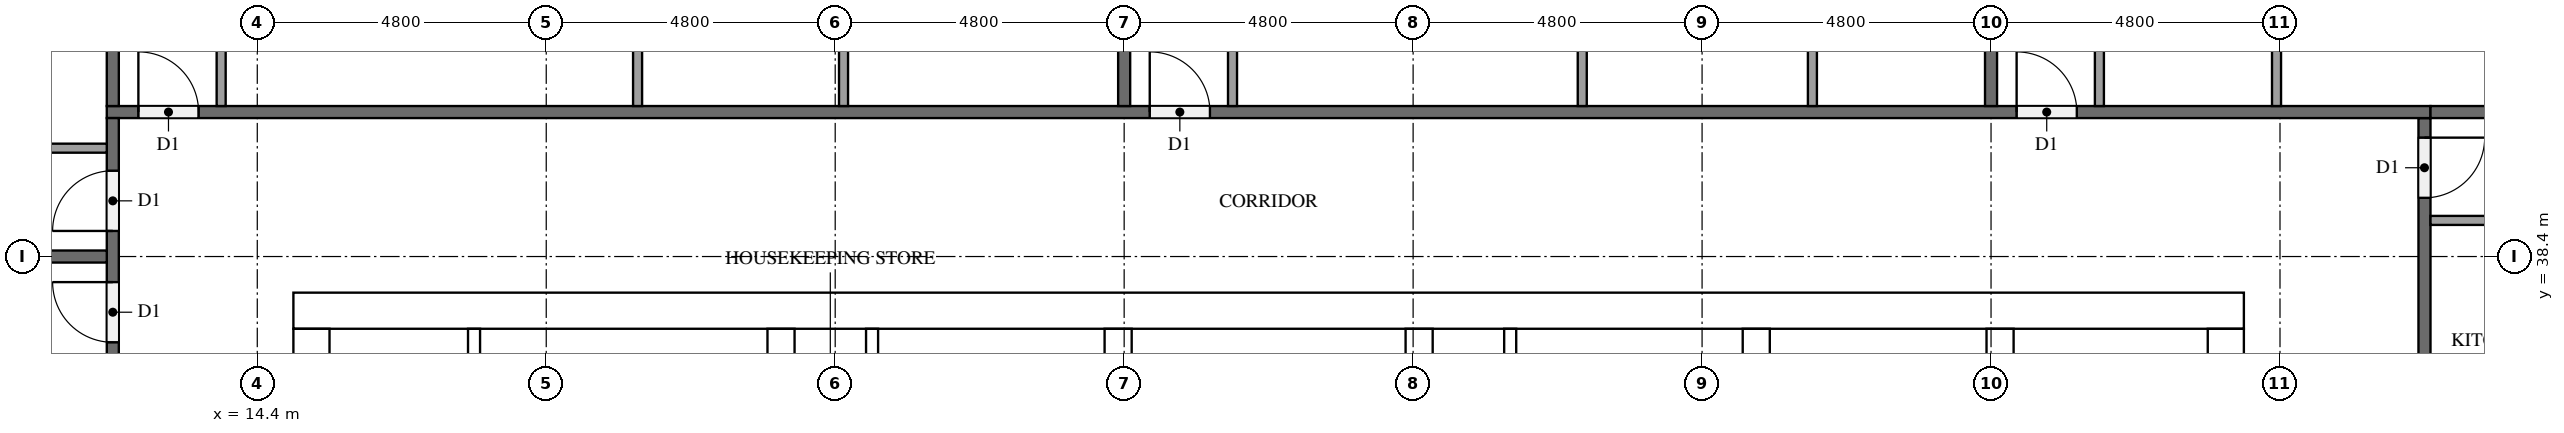
"""IFC4 building model, lengths in metres.
Left out: names, types, materials, properties, quantities, classifications, styles, units other than length and angle.
Written with IfcOpenShell. Run it as: python <this file> out.ifc"""

import sys

from ifc_helpers import new_model, si_unit, direction, frame, frame_2d, origin, place, context, subcontext, project, spatial, rectangle, extrude, element, fill, save


model = new_model("IFC4")
c1 = context("Model", 3, precision=1e-05, world=origin(), true_north=direction((0.0, 1.0)))
c2 = subcontext(c1, "Body", "Model", "MODEL_VIEW")
j1 = project(units=[si_unit("LENGTHUNIT", "METRE"), si_unit("PLANEANGLEUNIT", "RADIAN")], contexts=[c1])
p1 = place(None, origin())
s1 = spatial("IfcSite", under=j1, at=p1, CompositionType="ELEMENT")
p2 = place(p1, origin())
s2 = spatial("IfcBuilding", under=s1, at=p2, CompositionType="ELEMENT")
p3 = place(p2, frame((0.0, 0.0, 256.2)))
s3 = spatial("IfcBuildingStorey", under=s2, at=p3, CompositionType="ELEMENT", Elevation=256.2)
p4 = place(p3, frame((15.0, 37.5, 0.0), z_axis=(0.0, 0.0, 1.0), x_axis=(1.0, 0.0, 0.0)))
e1 = element("IfcWall", 1, at=p4, inside=s3, PredefinedType="SHEAR", context=c2, shape_type="SweptSolid", body=[
    extrude(rectangle(XDim=32.4, YDim=0.6, at=frame_2d((16.2, 0.0))), origin(), (0.0, 0.0, 1.0), 3.2),
])
p5 = place(p4, frame((15.3, 0.0, 0.0)))
e2 = element("IfcOpeningElement", 2, at=p5, cuts=e1, PredefinedType="OPENING", context=c2, shape_type="SweptSolid", body=[
    extrude(rectangle(XDim=1.8, YDim=2.1, at=frame_2d((0.9, 1.05))), frame((0.0, 0.31, 0.0), z_axis=(0.0, -1.0, 0.0), x_axis=(1.0, 0.0, 0.0)), (0.0, 0.0, 1.0), 0.62),
])
p6 = place(p4, frame((1.25, 0.0, 0.0)))
e3 = element("IfcOpeningElement", 3, at=p6, cuts=e1, PredefinedType="OPENING", context=c2, shape_type="SweptSolid", body=[
    extrude(rectangle(XDim=1.0, YDim=2.1, at=frame_2d((0.5, 1.05))), frame((0.0, 0.31, 0.0), z_axis=(0.0, -1.0, 0.0), x_axis=(1.0, 0.0, 0.0)), (0.0, 0.0, 1.0), 0.62),
])
p7 = place(p4, frame((4.988, 0.0, 0.0)))
e4 = element("IfcOpeningElement", 4, at=p7, cuts=e1, PredefinedType="OPENING", context=c2, shape_type="SweptSolid", body=[
    extrude(rectangle(XDim=1.0, YDim=2.1, at=frame_2d((0.5, 1.05))), frame((0.0, 0.31, 0.0), z_axis=(0.0, -1.0, 0.0), x_axis=(1.0, 0.0, 0.0)), (0.0, 0.0, 1.0), 0.62),
])
p8 = place(p3, frame((15.3, 15.6, 0.0), z_axis=(0.0, 0.0, 1.0), x_axis=(0.0, 1.0, 0.0)))
e5 = element("IfcWall", 5, at=p8, inside=s3, PredefinedType="SHEAR", context=c2, shape_type="SweptSolid", body=[
    extrude(rectangle(XDim=21.6, YDim=0.6, at=frame_2d((10.8, 0.0))), origin(), (0.0, 0.0, 1.0), 3.2),
])
p9 = place(p8, frame((5.16, 0.0, 0.0)))
e6 = element("IfcOpeningElement", 6, at=p9, cuts=e5, PredefinedType="OPENING", context=c2, shape_type="SweptSolid", body=[
    extrude(rectangle(XDim=1.2, YDim=2.1, at=frame_2d((0.6, 1.05))), frame((0.0, 0.31, 0.0), z_axis=(0.0, -1.0, 0.0), x_axis=(1.0, 0.0, 0.0)), (0.0, 0.0, 1.0), 0.62),
])
p10 = place(p3, frame((47.1, 15.6, 0.0), z_axis=(0.0, 0.0, 1.0), x_axis=(0.0, 1.0, 0.0)))
e7 = element("IfcWall", 7, at=p10, inside=s3, PredefinedType="SHEAR", context=c2, shape_type="SweptSolid", body=[
    extrude(rectangle(XDim=21.6, YDim=0.6, at=frame_2d((10.8, 0.0))), origin(), (0.0, 0.0, 1.0), 3.2),
])
p11 = place(p10, frame((10.5, 0.0, 0.0)))
e8 = element("IfcOpeningElement", 8, at=p11, cuts=e7, PredefinedType="OPENING", context=c2, shape_type="SweptSolid", body=[
    extrude(rectangle(XDim=1.2, YDim=2.1, at=frame_2d((0.6, 1.05))), frame((0.0, 0.31, 0.0), z_axis=(0.0, -1.0, 0.0), x_axis=(1.0, 0.0, 0.0)), (0.0, 0.0, 1.0), 0.62),
])
p12 = place(p3, frame((23.1, 15.6, 0.0), z_axis=(0.0, 0.0, 1.0), x_axis=(0.0, 1.0, 0.0)))
e9 = element("IfcWall", 9, at=p12, inside=s3, PredefinedType="SHEAR", context=c2, shape_type="SweptSolid", body=[
    extrude(rectangle(XDim=21.6, YDim=0.45, at=frame_2d((10.8, 0.0))), origin(), (0.0, 0.0, 1.0), 3.2),
])
p13 = place(p3, frame((39.3, 27.75, 0.0), z_axis=(0.0, 0.0, 1.0), x_axis=(0.0, 1.0, 0.0)))
e10 = element("IfcWall", 10, at=p13, inside=s3, PredefinedType="SHEAR", context=c2, shape_type="SweptSolid", body=[
    extrude(rectangle(XDim=9.45, YDim=0.45, at=frame_2d((4.725, 0.0))), origin(), (0.0, 0.0, 1.0), 3.2),
])
p14 = place(p3, frame((43.35, 27.75, 0.0), z_axis=(0.0, 0.0, 1.0), x_axis=(0.0, 1.0, 0.0)))
e11 = element("IfcWall", 11, at=p14, inside=s3, PredefinedType="SHEAR", context=c2, shape_type="SweptSolid", body=[
    extrude(rectangle(XDim=9.45, YDim=0.45, at=frame_2d((4.725, 0.0))), origin(), (0.0, 0.0, 1.0), 3.2),
])
p15 = place(p14, frame((7.65, 0.0, 0.0)))
e12 = element("IfcOpeningElement", 12, at=p15, cuts=e11, PredefinedType="OPENING", context=c2, shape_type="SweptSolid", body=[
    extrude(rectangle(XDim=1.2, YDim=2.1, at=frame_2d((0.6, 1.05))), frame((0.0, 0.235, 0.0), z_axis=(0.0, -1.0, 0.0), x_axis=(1.0, 0.0, 0.0)), (0.0, 0.0, 1.0), 0.47),
])
for number, where, z_axis, x_axis in (
    (13, (28.7, 33.775, 0.0), (0.0, 0.0, 1.0), (0.0, 1.0, 0.0)),
    (14, (33.7, 33.775, 0.0), (0.0, 0.0, 1.0), (0.0, 1.0, 0.0)),
):
    element("IfcWall", number, at=place(p3, frame(where, z_axis=z_axis, x_axis=x_axis)), inside=s3, PredefinedType="SHEAR", context=c2, shape_type="SweptSolid", body=[
        extrude(rectangle(XDim=3.425, YDim=0.45, at=frame_2d((1.712, 0.0))), origin(), (0.0, 0.0, 1.0), 3.2),
    ])
p16 = place(p3, frame((18.001, 31.475, 0.0), z_axis=(0.0, 0.0, 1.0), x_axis=(0.0, 1.0, 0.0)))
e15 = element("IfcWall", 15, at=p16, inside=s3, PredefinedType="PARTITIONING", context=c2, shape_type="SweptSolid", body=[
    extrude(rectangle(XDim=5.725, YDim=0.2, at=frame_2d((2.862, 0.0))), origin(), (0.0, 0.0, 1.0), 3.2),
])
for number, where, z_axis, x_axis in (
    (16, (24.613, 33.775, 0.0), (0.0, 0.0, 1.0), (0.0, 1.0, 0.0)),
    (17, (35.212, 33.775, 0.0), (0.0, 0.0, 1.0), (0.0, 1.0, 0.0)),
):
    element("IfcWall", number, at=place(p3, frame(where, z_axis=z_axis, x_axis=x_axis)), inside=s3, PredefinedType="PARTITIONING", context=c2, shape_type="SweptSolid", body=[
        extrude(rectangle(XDim=3.425, YDim=0.2, at=frame_2d((1.712, 0.0))), origin(), (0.0, 0.0, 1.0), 3.2),
    ])
p17 = place(p3, frame((50.4, 40.7, 0.0), z_axis=(0.0, 0.0, 1.0), x_axis=(0.0, -1.0, 0.0)))
e18 = element("IfcWall", 18, at=p17, inside=s3, PredefinedType="PARTITIONING", context=c2, shape_type="SweptSolid", body=[
    extrude(rectangle(XDim=28.6, YDim=0.2, at=frame_2d((14.3, 0.0))), origin(), (0.0, 0.0, 1.0), 3.2),
])
p18 = place(p17, frame((19.525, 0.0, 0.0)))
e19 = element("IfcOpeningElement", 19, at=p18, cuts=e18, PredefinedType="OPENING", context=c2, shape_type="SweptSolid", body=[
    extrude(rectangle(XDim=1.0, YDim=2.1, at=frame_2d((0.5, 1.05))), frame((0.0, 0.11, 0.0), z_axis=(0.0, -1.0, 0.0), x_axis=(1.0, 0.0, 0.0)), (0.0, 0.0, 1.0), 0.22),
])
p19 = place(p17, frame((17.675, 0.0, 0.0)))
e20 = element("IfcOpeningElement", 20, at=p19, cuts=e18, PredefinedType="OPENING", context=c2, shape_type="SweptSolid", body=[
    extrude(rectangle(XDim=1.0, YDim=2.1, at=frame_2d((0.5, 1.05))), frame((0.0, 0.11, 0.0), z_axis=(0.0, -1.0, 0.0), x_axis=(1.0, 0.0, 0.0)), (0.0, 0.0, 1.0), 0.22),
])
p20 = place(p17, frame((0.325, 0.0, 0.0)))
e21 = element("IfcOpeningElement", 21, at=p20, cuts=e18, PredefinedType="OPENING", context=c2, shape_type="SweptSolid", body=[
    extrude(rectangle(XDim=1.0, YDim=2.1, at=frame_2d((0.5, 1.05))), frame((0.0, 0.11, 0.0), z_axis=(0.0, -1.0, 0.0), x_axis=(1.0, 0.0, 0.0)), (0.0, 0.0, 1.0), 0.22),
])
p21 = place(p3, frame((11.9, 40.8, 0.0), z_axis=(0.0, 0.0, 1.0), x_axis=(1.0, 0.0, 0.0)))
e22 = element("IfcWall", 22, at=p21, inside=s3, PredefinedType="PARTITIONING", context=c2, shape_type="SweptSolid", body=[
    extrude(rectangle(XDim=38.6, YDim=0.2, at=frame_2d((19.3, 0.0))), origin(), (0.0, 0.0, 1.0), 3.2),
])
p22 = place(p21, frame((31.725, 0.0, 0.0)))
e23 = element("IfcOpeningElement", 23, at=p22, cuts=e22, PredefinedType="OPENING", context=c2, shape_type="SweptSolid", body=[
    extrude(rectangle(XDim=1.0, YDim=2.1, at=frame_2d((0.5, 1.05))), frame((0.0, 0.11, 0.0), z_axis=(0.0, -1.0, 0.0), x_axis=(1.0, 0.0, 0.0)), (0.0, 0.0, 1.0), 0.22),
])
p23 = place(p21, frame((17.325, 0.0, 0.0)))
e24 = element("IfcOpeningElement", 24, at=p23, cuts=e22, PredefinedType="OPENING", context=c2, shape_type="SweptSolid", body=[
    extrude(rectangle(XDim=1.0, YDim=2.1, at=frame_2d((0.5, 1.05))), frame((0.0, 0.11, 0.0), z_axis=(0.0, -1.0, 0.0), x_axis=(1.0, 0.0, 0.0)), (0.0, 0.0, 1.0), 0.22),
])
p24 = place(p21, frame((0.525, 0.0, 0.0)))
e25 = element("IfcOpeningElement", 25, at=p24, cuts=e22, PredefinedType="OPENING", context=c2, shape_type="SweptSolid", body=[
    extrude(rectangle(XDim=1.0, YDim=2.1, at=frame_2d((0.5, 1.05))), frame((0.0, 0.11, 0.0), z_axis=(0.0, -1.0, 0.0), x_axis=(1.0, 0.0, 0.0)), (0.0, 0.0, 1.0), 0.22),
])
p25 = place(p3, frame((12.0, 12.1, 0.0), z_axis=(0.0, 0.0, 1.0), x_axis=(0.0, 1.0, 0.0)))
e26 = element("IfcWall", 26, at=p25, inside=s3, PredefinedType="PARTITIONING", context=c2, shape_type="SweptSolid", body=[
    extrude(rectangle(XDim=28.6, YDim=0.2, at=frame_2d((14.3, 0.0))), origin(), (0.0, 0.0, 1.0), 3.2),
])
p26 = place(p25, frame((26.725, 0.0, 0.0)))
e27 = element("IfcOpeningElement", 27, at=p26, cuts=e26, PredefinedType="OPENING", context=c2, shape_type="SweptSolid", body=[
    extrude(rectangle(XDim=1.0, YDim=2.1, at=frame_2d((0.5, 1.05))), frame((0.0, 0.11, 0.0), z_axis=(0.0, -1.0, 0.0), x_axis=(1.0, 0.0, 0.0)), (0.0, 0.0, 1.0), 0.22),
])
p27 = place(p25, frame((24.875, 0.0, 0.0)))
e28 = element("IfcOpeningElement", 28, at=p27, cuts=e26, PredefinedType="OPENING", context=c2, shape_type="SweptSolid", body=[
    extrude(rectangle(XDim=1.0, YDim=2.1, at=frame_2d((0.5, 1.05))), frame((0.0, 0.11, 0.0), z_axis=(0.0, -1.0, 0.0), x_axis=(1.0, 0.0, 0.0)), (0.0, 0.0, 1.0), 0.22),
])
p28 = place(p25, frame((17.675, 0.0, 0.0)))
e29 = element("IfcOpeningElement", 29, at=p28, cuts=e26, PredefinedType="OPENING", context=c2, shape_type="SweptSolid", body=[
    extrude(rectangle(XDim=1.0, YDim=2.1, at=frame_2d((0.5, 1.05))), frame((0.0, 0.11, 0.0), z_axis=(0.0, -1.0, 0.0), x_axis=(1.0, 0.0, 0.0)), (0.0, 0.0, 1.0), 0.22),
])
p29 = place(p25, frame((2.725, 0.0, 0.0)))
e30 = element("IfcOpeningElement", 30, at=p29, cuts=e26, PredefinedType="OPENING", context=c2, shape_type="SweptSolid", body=[
    extrude(rectangle(XDim=1.0, YDim=2.1, at=frame_2d((0.5, 1.05))), frame((0.0, 0.11, 0.0), z_axis=(0.0, -1.0, 0.0), x_axis=(1.0, 0.0, 0.0)), (0.0, 0.0, 1.0), 0.22),
])
p30 = place(p25, frame((0.875, 0.0, 0.0)))
e31 = element("IfcOpeningElement", 31, at=p30, cuts=e26, PredefinedType="OPENING", context=c2, shape_type="SweptSolid", body=[
    extrude(rectangle(XDim=1.0, YDim=2.1, at=frame_2d((0.5, 1.05))), frame((0.0, 0.11, 0.0), z_axis=(0.0, -1.0, 0.0), x_axis=(1.0, 0.0, 0.0)), (0.0, 0.0, 1.0), 0.22),
])
p31 = place(p3, frame((50.5, 40.8, 0.0), z_axis=(0.0, 0.0, 1.0), x_axis=(1.0, 0.0, 0.0)))
e32 = element("IfcWall", 32, at=p31, inside=s3, PredefinedType="PARTITIONING", context=c2, shape_type="SweptSolid", body=[
    extrude(rectangle(XDim=7.0, YDim=0.2, at=frame_2d((3.5, 0.0))), origin(), (0.0, 0.0, 1.0), 3.2),
])
p32 = place(p3, frame((43.2, 52.525, 0.0), z_axis=(0.0, 0.0, 1.0), x_axis=(0.0, -1.0, 0.0)))
e33 = element("IfcWall", 33, at=p32, inside=s3, PredefinedType="PARTITIONING", context=c2, shape_type="SweptSolid", body=[
    extrude(rectangle(XDim=11.625, YDim=0.2, at=frame_2d((5.812, 0.0))), origin(), (0.0, 0.0, 1.0), 3.2),
])
for number, where, z_axis, x_axis in (
    (34, (28.8, 52.7, 0.0), (0.0, 0.0, 1.0), (0.0, -1.0, 0.0)),
    (35, (12.0, 52.7, 0.0), (0.0, 0.0, 1.0), (0.0, -1.0, 0.0)),
):
    element("IfcWall", number, at=place(p3, frame(where, z_axis=z_axis, x_axis=x_axis)), inside=s3, PredefinedType="PARTITIONING", context=c2, shape_type="SweptSolid", body=[
        extrude(rectangle(XDim=11.8, YDim=0.2, at=frame_2d((5.9, 0.0))), origin(), (0.0, 0.0, 1.0), 3.2),
    ])
p33 = place(p3, frame((0.275, 38.4, 0.0), z_axis=(0.0, 0.0, 1.0), x_axis=(1.0, 0.0, 0.0)))
e36 = element("IfcWall", 36, at=p33, inside=s3, PredefinedType="PARTITIONING", context=c2, shape_type="SweptSolid", body=[
    extrude(rectangle(XDim=11.625, YDim=0.2, at=frame_2d((5.812, 0.0))), origin(), (0.0, 0.0, 1.0), 3.2),
])
p34 = place(p3, frame((50.5, 39.0, 0.0), z_axis=(0.0, 0.0, 1.0), x_axis=(1.0, 0.0, 0.0)))
e37 = element("IfcWall", 37, at=p34, inside=s3, PredefinedType="PARTITIONING", context=c2, shape_type="SweptSolid", body=[
    extrude(rectangle(XDim=2.225, YDim=0.15, at=frame_2d((1.113, 0.0))), origin(), (0.0, 0.0, 1.0), 3.2),
])
p35 = place(p3, frame((47.942, 40.9, 0.0), z_axis=(0.0, 0.0, 1.0), x_axis=(0.0, 1.0, 0.0)))
e38 = element("IfcWall", 38, at=p35, inside=s3, PredefinedType="PARTITIONING", context=c2, shape_type="SweptSolid", body=[
    extrude(rectangle(XDim=2.975, YDim=0.15, at=frame_2d((1.488, 0.0))), origin(), (0.0, 0.0, 1.0), 3.2),
])
p36 = place(p3, frame((45.0, 40.9, 0.0), z_axis=(0.0, 0.0, 1.0), x_axis=(0.0, 1.0, 0.0)))
e39 = element("IfcWall", 39, at=p36, inside=s3, PredefinedType="PARTITIONING", context=c2, shape_type="SweptSolid", body=[
    extrude(rectangle(XDim=3.125, YDim=0.15, at=frame_2d((1.562, 0.0))), origin(), (0.0, 0.0, 1.0), 3.2),
])
for number, where, z_axis, x_axis in (
    (40, (36.41, 40.9, 0.0), (0.0, 0.0, 1.0), (0.0, 1.0, 0.0)),
    (41, (40.233, 40.9, 0.0), (0.0, 0.0, 1.0), (0.0, 1.0, 0.0)),
):
    element("IfcWall", number, at=place(p3, frame(where, z_axis=z_axis, x_axis=x_axis)), inside=s3, PredefinedType="PARTITIONING", context=c2, shape_type="SweptSolid", body=[
        extrude(rectangle(XDim=2.975, YDim=0.15, at=frame_2d((1.488, 0.0))), origin(), (0.0, 0.0, 1.0), 3.2),
    ])
p37 = place(p3, frame((30.6, 40.9, 0.0), z_axis=(0.0, 0.0, 1.0), x_axis=(0.0, 1.0, 0.0)))
e42 = element("IfcWall", 42, at=p37, inside=s3, PredefinedType="PARTITIONING", context=c2, shape_type="SweptSolid", body=[
    extrude(rectangle(XDim=3.125, YDim=0.15, at=frame_2d((1.562, 0.0))), origin(), (0.0, 0.0, 1.0), 3.2),
])
for number, where, z_axis, x_axis in (
    (43, (20.717, 40.9, 0.0), (0.0, 0.0, 1.0), (0.0, 1.0, 0.0)),
    (44, (24.138, 40.9, 0.0), (0.0, 0.0, 1.0), (0.0, 1.0, 0.0)),
):
    element("IfcWall", number, at=place(p3, frame(where, z_axis=z_axis, x_axis=x_axis)), inside=s3, PredefinedType="PARTITIONING", context=c2, shape_type="SweptSolid", body=[
        extrude(rectangle(XDim=4.325, YDim=0.15, at=frame_2d((2.163, 0.0))), origin(), (0.0, 0.0, 1.0), 3.2),
    ])
p38 = place(p3, frame((13.8, 40.9, 0.0), z_axis=(0.0, 0.0, 1.0), x_axis=(0.0, 1.0, 0.0)))
e45 = element("IfcWall", 45, at=p38, inside=s3, PredefinedType="PARTITIONING", context=c2, shape_type="SweptSolid", body=[
    extrude(rectangle(XDim=4.475, YDim=0.15, at=frame_2d((2.238, 0.0))), origin(), (0.0, 0.0, 1.0), 3.2),
])
p39 = place(p3, frame((11.9, 40.2, 0.0), z_axis=(0.0, 0.0, 1.0), x_axis=(-1.0, 0.0, 0.0)))
e46 = element("IfcWall", 46, at=p39, inside=s3, PredefinedType="PARTITIONING", context=c2, shape_type="SweptSolid", body=[
    extrude(rectangle(XDim=3.425, YDim=0.15, at=frame_2d((1.712, 0.0))), origin(), (0.0, 0.0, 1.0), 3.2),
])
p40 = place(p5, origin())
e47 = element("IfcDoor", 47, at=p40, inside=s3, OperationType="DOUBLE_DOOR_SINGLE_SWING", PredefinedType="DOOR", context=c2, shape_type="SweptSolid", body=[
    extrude(rectangle(XDim=1.8, YDim=2.1, at=frame_2d((0.9, 1.05))), frame((0.0, 0.025, 0.0), z_axis=(0.0, -1.0, 0.0), x_axis=(1.0, 0.0, 0.0)), (0.0, 0.0, 1.0), 0.05),
])
fill(e2, e47)
p41 = place(p6, origin())
e48 = element("IfcDoor", 48, at=p41, inside=s3, OperationType="SINGLE_SWING_RIGHT", PredefinedType="DOOR", context=c2, shape_type="SweptSolid", body=[
    extrude(rectangle(XDim=1.0, YDim=2.1, at=frame_2d((0.5, 1.05))), frame((0.0, 0.025, 0.0), z_axis=(0.0, -1.0, 0.0), x_axis=(1.0, 0.0, 0.0)), (0.0, 0.0, 1.0), 0.05),
])
fill(e3, e48)
p42 = place(p7, origin())
e49 = element("IfcDoor", 49, at=p42, inside=s3, OperationType="SINGLE_SWING_LEFT", PredefinedType="DOOR", context=c2, shape_type="SweptSolid", body=[
    extrude(rectangle(XDim=1.0, YDim=2.1, at=frame_2d((0.5, 1.05))), frame((0.0, 0.025, 0.0), z_axis=(0.0, -1.0, 0.0), x_axis=(1.0, 0.0, 0.0)), (0.0, 0.0, 1.0), 0.05),
])
fill(e4, e49)
p43 = place(p20, origin())
e50 = element("IfcDoor", 50, at=p43, inside=s3, OperationType="SINGLE_SWING_LEFT", PredefinedType="DOOR", context=c2, shape_type="SweptSolid", body=[
    extrude(rectangle(XDim=1.0, YDim=2.1, at=frame_2d((0.5, 1.05))), frame((0.0, 0.025, 0.0), z_axis=(0.0, -1.0, 0.0), x_axis=(1.0, 0.0, 0.0)), (0.0, 0.0, 1.0), 0.05),
])
fill(e21, e50)
p44 = place(p22, origin())
e51 = element("IfcDoor", 51, at=p44, inside=s3, OperationType="SINGLE_SWING_LEFT", PredefinedType="DOOR", context=c2, shape_type="SweptSolid", body=[
    extrude(rectangle(XDim=1.0, YDim=2.1, at=frame_2d((0.5, 1.05))), frame((0.0, 0.025, 0.0), z_axis=(0.0, -1.0, 0.0), x_axis=(1.0, 0.0, 0.0)), (0.0, 0.0, 1.0), 0.05),
])
fill(e23, e51)
p45 = place(p23, origin())
e52 = element("IfcDoor", 52, at=p45, inside=s3, OperationType="SINGLE_SWING_LEFT", PredefinedType="DOOR", context=c2, shape_type="SweptSolid", body=[
    extrude(rectangle(XDim=1.0, YDim=2.1, at=frame_2d((0.5, 1.05))), frame((0.0, 0.025, 0.0), z_axis=(0.0, -1.0, 0.0), x_axis=(1.0, 0.0, 0.0)), (0.0, 0.0, 1.0), 0.05),
])
fill(e24, e52)
p46 = place(p24, origin())
e53 = element("IfcDoor", 53, at=p46, inside=s3, OperationType="SINGLE_SWING_LEFT", PredefinedType="DOOR", context=c2, shape_type="SweptSolid", body=[
    extrude(rectangle(XDim=1.0, YDim=2.1, at=frame_2d((0.5, 1.05))), frame((0.0, 0.025, 0.0), z_axis=(0.0, -1.0, 0.0), x_axis=(1.0, 0.0, 0.0)), (0.0, 0.0, 1.0), 0.05),
])
fill(e25, e53)
p47 = place(p26, origin())
e54 = element("IfcDoor", 54, at=p47, inside=s3, OperationType="SINGLE_SWING_LEFT", PredefinedType="DOOR", context=c2, shape_type="SweptSolid", body=[
    extrude(rectangle(XDim=1.0, YDim=2.1, at=frame_2d((0.5, 1.05))), frame((0.0, 0.025, 0.0), z_axis=(0.0, -1.0, 0.0), x_axis=(1.0, 0.0, 0.0)), (0.0, 0.0, 1.0), 0.05),
])
fill(e27, e54)
p48 = place(p27, origin())
e55 = element("IfcDoor", 55, at=p48, inside=s3, OperationType="SINGLE_SWING_RIGHT", PredefinedType="DOOR", context=c2, shape_type="SweptSolid", body=[
    extrude(rectangle(XDim=1.0, YDim=2.1, at=frame_2d((0.5, 1.05))), frame((0.0, 0.025, 0.0), z_axis=(0.0, -1.0, 0.0), x_axis=(1.0, 0.0, 0.0)), (0.0, 0.0, 1.0), 0.05),
])
fill(e28, e55)
save(model, sys.argv[1])
